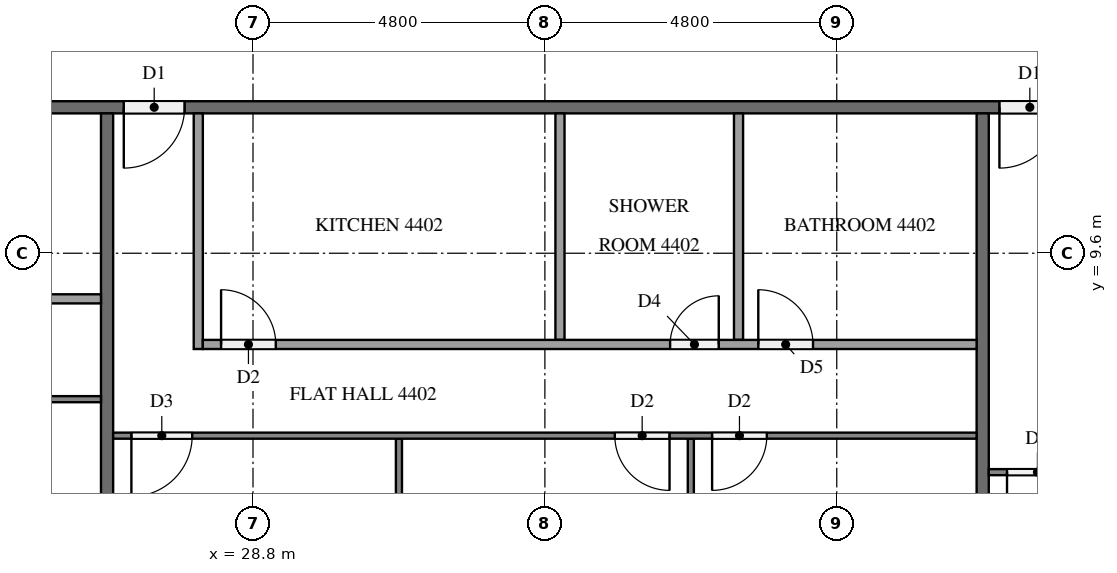
"""IFC4 building model, lengths in metres.
Left out: names, types, materials, properties, quantities, classifications, styles, units other than length and angle.
Written with IfcOpenShell. Run it as: python <this file> out.ifc"""

import sys

from ifc_helpers import new_model, si_unit, direction, frame, frame_2d, origin, place, context, subcontext, project, spatial, rectangle, extrude, element, fill, save


model = new_model("IFC4")
c1 = context("Model", 3, precision=1e-05, world=origin(), true_north=direction((0.0, 1.0)))
c2 = subcontext(c1, "Body", "Model", "MODEL_VIEW")
j1 = project(units=[si_unit("LENGTHUNIT", "METRE"), si_unit("PLANEANGLEUNIT", "RADIAN")], contexts=[c1])
p1 = place(None, origin())
s1 = spatial("IfcSite", under=j1, at=p1, CompositionType="ELEMENT")
p2 = place(p1, origin())
s2 = spatial("IfcBuilding", under=s1, at=p2, CompositionType="ELEMENT")
p3 = place(p2, frame((0.0, 0.0, 170.0)))
s3 = spatial("IfcBuildingStorey", under=s2, at=p3, CompositionType="ELEMENT", Elevation=170.0)
p4 = place(p3, frame((50.5, 12.0, 0.0), z_axis=(0.0, 0.0, 1.0), x_axis=(-1.0, 0.0, 0.0)))
e1 = element("IfcWall", 1, at=p4, inside=s3, PredefinedType="PARTITIONING", context=c2, shape_type="SweptSolid", body=[
    extrude(rectangle(XDim=38.6, YDim=0.2, at=frame_2d((19.3, 0.0))), origin(), (0.0, 0.0, 1.0), 3.1),
])
p5 = place(p4, frame((37.225, 0.0, 0.0)))
e2 = element("IfcOpeningElement", 2, at=p5, cuts=e1, PredefinedType="OPENING", context=c2, shape_type="SweptSolid", body=[
    extrude(rectangle(XDim=1.0, YDim=2.1, at=frame_2d((0.5, 1.05))), frame((0.0, 0.11, 0.0), z_axis=(0.0, -1.0, 0.0), x_axis=(1.0, 0.0, 0.0)), (0.0, 0.0, 1.0), 0.22),
])
p6 = place(p4, frame((22.825, 0.0, 0.0)))
e3 = element("IfcOpeningElement", 3, at=p6, cuts=e1, PredefinedType="OPENING", context=c2, shape_type="SweptSolid", body=[
    extrude(rectangle(XDim=1.0, YDim=2.1, at=frame_2d((0.5, 1.05))), frame((0.0, 0.11, 0.0), z_axis=(0.0, -1.0, 0.0), x_axis=(1.0, 0.0, 0.0)), (0.0, 0.0, 1.0), 0.22),
])
p7 = place(p4, frame((8.425, 0.0, 0.0)))
e4 = element("IfcOpeningElement", 4, at=p7, cuts=e1, PredefinedType="OPENING", context=c2, shape_type="SweptSolid", body=[
    extrude(rectangle(XDim=1.0, YDim=2.1, at=frame_2d((0.5, 1.05))), frame((0.0, 0.11, 0.0), z_axis=(0.0, -1.0, 0.0), x_axis=(1.0, 0.0, 0.0)), (0.0, 0.0, 1.0), 0.22),
])
for number, where, z_axis, x_axis in (
    (5, (26.4, 11.9, 0.0), (0.0, 0.0, 1.0), (0.0, -1.0, 0.0)),
    (6, (40.8, 11.9, 0.0), (0.0, 0.0, 1.0), (0.0, -1.0, 0.0)),
):
    element("IfcWall", number, at=place(p3, frame(where, z_axis=z_axis, x_axis=x_axis)), inside=s3, PredefinedType="PARTITIONING", context=c2, shape_type="SweptSolid", body=[
        extrude(rectangle(XDim=11.8, YDim=0.2, at=frame_2d((5.9, 0.0))), origin(), (0.0, 0.0, 1.0), 3.1),
    ])
p8 = place(p3, frame((26.3, 7.2, 0.0), z_axis=(0.0, 0.0, 1.0), x_axis=(-1.0, 0.0, 0.0)))
e7 = element("IfcWall", 7, at=p8, inside=s3, PredefinedType="PARTITIONING", context=c2, shape_type="SweptSolid", body=[
    extrude(rectangle(XDim=14.2, YDim=0.1, at=frame_2d((7.1, 0.0))), origin(), (0.0, 0.0, 1.0), 3.1),
])
p9 = place(p8, frame((12.9, 0.0, 0.0)))
e8 = element("IfcOpeningElement", 8, at=p9, cuts=e7, PredefinedType="OPENING", context=c2, shape_type="SweptSolid", body=[
    extrude(rectangle(XDim=1.0, YDim=2.1, at=frame_2d((0.5, 1.05))), frame((0.0, 0.06, 0.0), z_axis=(0.0, -1.0, 0.0), x_axis=(1.0, 0.0, 0.0)), (0.0, 0.0, 1.0), 0.12),
])
p10 = place(p8, frame((5.05, 0.0, 0.0)))
e9 = element("IfcOpeningElement", 9, at=p10, cuts=e7, PredefinedType="OPENING", context=c2, shape_type="SweptSolid", body=[
    extrude(rectangle(XDim=0.9, YDim=2.1, at=frame_2d((0.45, 1.05))), frame((0.0, 0.06, 0.0), z_axis=(0.0, -1.0, 0.0), x_axis=(1.0, 0.0, 0.0)), (0.0, 0.0, 1.0), 0.12),
])
p11 = place(p8, frame((3.45, 0.0, 0.0)))
e10 = element("IfcOpeningElement", 10, at=p11, cuts=e7, PredefinedType="OPENING", context=c2, shape_type="SweptSolid", body=[
    extrude(rectangle(XDim=0.9, YDim=2.1, at=frame_2d((0.45, 1.05))), frame((0.0, 0.06, 0.0), z_axis=(0.0, -1.0, 0.0), x_axis=(1.0, 0.0, 0.0)), (0.0, 0.0, 1.0), 0.12),
])
p12 = place(p3, frame((13.575, 8.85, 0.0), z_axis=(0.0, 0.0, 1.0), x_axis=(1.0, 0.0, 0.0)))
e11 = element("IfcWall", 11, at=p12, inside=s3, PredefinedType="PARTITIONING", context=c2, shape_type="SweptSolid", body=[
    extrude(rectangle(XDim=12.725, YDim=0.15, at=frame_2d((6.363, 0.0))), origin(), (0.0, 0.0, 1.0), 3.1),
])
p13 = place(p12, frame((0.3, 0.0, 0.0)))
e12 = element("IfcOpeningElement", 12, at=p13, cuts=e11, PredefinedType="OPENING", context=c2, shape_type="SweptSolid", body=[
    extrude(rectangle(XDim=0.9, YDim=2.1, at=frame_2d((0.45, 1.05))), frame((0.0, 0.085, 0.0), z_axis=(0.0, -1.0, 0.0), x_axis=(1.0, 0.0, 0.0)), (0.0, 0.0, 1.0), 0.17),
])
p14 = place(p12, frame((7.685, 0.0, 0.0)))
e13 = element("IfcOpeningElement", 13, at=p14, cuts=e11, PredefinedType="OPENING", context=c2, shape_type="SweptSolid", body=[
    extrude(rectangle(XDim=0.8, YDim=2.1, at=frame_2d((0.4, 1.05))), frame((0.0, 0.085, 0.0), z_axis=(0.0, -1.0, 0.0), x_axis=(1.0, 0.0, 0.0)), (0.0, 0.0, 1.0), 0.17),
])
p15 = place(p12, frame((9.135, 0.0, 0.0)))
e14 = element("IfcOpeningElement", 14, at=p15, cuts=e11, PredefinedType="OPENING", context=c2, shape_type="SweptSolid", body=[
    extrude(rectangle(XDim=0.9, YDim=2.1, at=frame_2d((0.45, 1.05))), frame((0.0, 0.085, 0.0), z_axis=(0.0, -1.0, 0.0), x_axis=(1.0, 0.0, 0.0)), (0.0, 0.0, 1.0), 0.17),
])
for number, where, z_axis, x_axis in (
    (15, (31.2, 6.55, 0.0), (0.0, 0.0, 1.0), (0.0, -1.0, 0.0)),
    (16, (36.0, 6.55, 0.0), (0.0, 0.0, 1.0), (0.0, -1.0, 0.0)),
):
    element("IfcWall", number, at=place(p3, frame(where, z_axis=z_axis, x_axis=x_axis)), inside=s3, PredefinedType="PARTITIONING", context=c2, shape_type="SweptSolid", body=[
        extrude(rectangle(XDim=6.45, YDim=0.1, at=frame_2d((3.225, 0.0))), origin(), (0.0, 0.0, 1.0), 3.1),
    ])
p16 = place(p3, frame((40.7, 6.6, 0.0), z_axis=(0.0, 0.0, 1.0), x_axis=(-1.0, 0.0, 0.0)))
e17 = element("IfcWall", 17, at=p16, inside=s3, PredefinedType="PARTITIONING", context=c2, shape_type="SweptSolid", body=[
    extrude(rectangle(XDim=14.2, YDim=0.1, at=frame_2d((7.1, 0.0))), origin(), (0.0, 0.0, 1.0), 3.1),
])
p17 = place(p16, frame((12.9, 0.0, 0.0)))
e18 = element("IfcOpeningElement", 18, at=p17, cuts=e17, PredefinedType="OPENING", context=c2, shape_type="SweptSolid", body=[
    extrude(rectangle(XDim=1.0, YDim=2.1, at=frame_2d((0.5, 1.05))), frame((0.0, 0.06, 0.0), z_axis=(0.0, -1.0, 0.0), x_axis=(1.0, 0.0, 0.0)), (0.0, 0.0, 1.0), 0.12),
])
p18 = place(p16, frame((5.05, 0.0, 0.0)))
e19 = element("IfcOpeningElement", 19, at=p18, cuts=e17, PredefinedType="OPENING", context=c2, shape_type="SweptSolid", body=[
    extrude(rectangle(XDim=0.9, YDim=2.1, at=frame_2d((0.45, 1.05))), frame((0.0, 0.06, 0.0), z_axis=(0.0, -1.0, 0.0), x_axis=(1.0, 0.0, 0.0)), (0.0, 0.0, 1.0), 0.12),
])
p19 = place(p16, frame((3.45, 0.0, 0.0)))
e20 = element("IfcOpeningElement", 20, at=p19, cuts=e17, PredefinedType="OPENING", context=c2, shape_type="SweptSolid", body=[
    extrude(rectangle(XDim=0.9, YDim=2.1, at=frame_2d((0.45, 1.05))), frame((0.0, 0.06, 0.0), z_axis=(0.0, -1.0, 0.0), x_axis=(1.0, 0.0, 0.0)), (0.0, 0.0, 1.0), 0.12),
])
for number, where, z_axis, x_axis in (
    (21, (33.848, 11.9, 0.0), (0.0, 0.0, 1.0), (0.0, -1.0, 0.0)),
    (22, (36.785, 11.9, 0.0), (0.0, 0.0, 1.0), (0.0, -1.0, 0.0)),
):
    element("IfcWall", number, at=place(p3, frame(where, z_axis=z_axis, x_axis=x_axis)), inside=s3, PredefinedType="PARTITIONING", context=c2, shape_type="SweptSolid", body=[
        extrude(rectangle(XDim=3.725, YDim=0.15, at=frame_2d((1.862, 0.0))), origin(), (0.0, 0.0, 1.0), 3.1),
    ])
p20 = place(p3, frame((27.9, 11.9, 0.0), z_axis=(0.0, 0.0, 1.0), x_axis=(0.0, -1.0, 0.0)))
e23 = element("IfcWall", 23, at=p20, inside=s3, PredefinedType="PARTITIONING", context=c2, shape_type="SweptSolid", body=[
    extrude(rectangle(XDim=3.875, YDim=0.15, at=frame_2d((1.938, 0.0))), origin(), (0.0, 0.0, 1.0), 3.1),
])
p21 = place(p3, frame((27.975, 8.1, 0.0), z_axis=(0.0, 0.0, 1.0), x_axis=(1.0, 0.0, 0.0)))
e24 = element("IfcWall", 24, at=p21, inside=s3, PredefinedType="PARTITIONING", context=c2, shape_type="SweptSolid", body=[
    extrude(rectangle(XDim=12.725, YDim=0.15, at=frame_2d((6.362, 0.0))), origin(), (0.0, 0.0, 1.0), 3.1),
])
p22 = place(p21, frame((0.3, 0.0, 0.0)))
e25 = element("IfcOpeningElement", 25, at=p22, cuts=e24, PredefinedType="OPENING", context=c2, shape_type="SweptSolid", body=[
    extrude(rectangle(XDim=0.9, YDim=2.1, at=frame_2d((0.45, 1.05))), frame((0.0, 0.085, 0.0), z_axis=(0.0, -1.0, 0.0), x_axis=(1.0, 0.0, 0.0)), (0.0, 0.0, 1.0), 0.17),
])
p23 = place(p21, frame((7.685, 0.0, 0.0)))
e26 = element("IfcOpeningElement", 26, at=p23, cuts=e24, PredefinedType="OPENING", context=c2, shape_type="SweptSolid", body=[
    extrude(rectangle(XDim=0.8, YDim=2.1, at=frame_2d((0.4, 1.05))), frame((0.0, 0.085, 0.0), z_axis=(0.0, -1.0, 0.0), x_axis=(1.0, 0.0, 0.0)), (0.0, 0.0, 1.0), 0.17),
])
p24 = place(p21, frame((9.135, 0.0, 0.0)))
e27 = element("IfcOpeningElement", 27, at=p24, cuts=e24, PredefinedType="OPENING", context=c2, shape_type="SweptSolid", body=[
    extrude(rectangle(XDim=0.9, YDim=2.1, at=frame_2d((0.45, 1.05))), frame((0.0, 0.085, 0.0), z_axis=(0.0, -1.0, 0.0), x_axis=(1.0, 0.0, 0.0)), (0.0, 0.0, 1.0), 0.17),
])
p25 = place(p3, frame((50.3, 6.0, 0.0), z_axis=(0.0, 0.0, 1.0), x_axis=(-1.0, 0.0, 0.0)))
e28 = element("IfcWall", 28, at=p25, inside=s3, PredefinedType="PARTITIONING", context=c2, shape_type="SweptSolid", body=[
    extrude(rectangle(XDim=9.4, YDim=0.1, at=frame_2d((4.7, 0.0))), origin(), (0.0, 0.0, 1.0), 3.1),
])
p26 = place(p25, frame((8.1, 0.0, 0.0)))
e29 = element("IfcOpeningElement", 29, at=p26, cuts=e28, PredefinedType="OPENING", context=c2, shape_type="SweptSolid", body=[
    extrude(rectangle(XDim=1.0, YDim=2.1, at=frame_2d((0.5, 1.05))), frame((0.0, 0.06, 0.0), z_axis=(0.0, -1.0, 0.0), x_axis=(1.0, 0.0, 0.0)), (0.0, 0.0, 1.0), 0.12),
])
p27 = place(p25, frame((0.3, 0.0, 0.0)))
e30 = element("IfcOpeningElement", 30, at=p27, cuts=e28, PredefinedType="OPENING", context=c2, shape_type="SweptSolid", body=[
    extrude(rectangle(XDim=0.9, YDim=2.1, at=frame_2d((0.45, 1.05))), frame((0.0, 0.06, 0.0), z_axis=(0.0, -1.0, 0.0), x_axis=(1.0, 0.0, 0.0)), (0.0, 0.0, 1.0), 0.12),
])
p28 = place(p6, origin())
e31 = element("IfcDoor", 31, at=p28, inside=s3, OperationType="SINGLE_SWING_RIGHT", PredefinedType="DOOR", context=c2, shape_type="SweptSolid", body=[
    extrude(rectangle(XDim=1.0, YDim=2.1, at=frame_2d((0.5, 1.05))), frame((0.0, 0.025, 0.0), z_axis=(0.0, -1.0, 0.0), x_axis=(1.0, 0.0, 0.0)), (0.0, 0.0, 1.0), 0.05),
])
fill(e3, e31)
p29 = place(p7, origin())
e32 = element("IfcDoor", 32, at=p29, inside=s3, OperationType="SINGLE_SWING_RIGHT", PredefinedType="DOOR", context=c2, shape_type="SweptSolid", body=[
    extrude(rectangle(XDim=1.0, YDim=2.1, at=frame_2d((0.5, 1.05))), frame((0.0, 0.025, 0.0), z_axis=(0.0, -1.0, 0.0), x_axis=(1.0, 0.0, 0.0)), (0.0, 0.0, 1.0), 0.05),
])
fill(e4, e32)
p30 = place(p17, origin())
e33 = element("IfcDoor", 33, at=p30, inside=s3, OperationType="SINGLE_SWING_RIGHT", PredefinedType="DOOR", context=c2, shape_type="SweptSolid", body=[
    extrude(rectangle(XDim=1.0, YDim=2.1, at=frame_2d((0.5, 1.05))), frame((0.0, 0.025, 0.0), z_axis=(0.0, -1.0, 0.0), x_axis=(1.0, 0.0, 0.0)), (0.0, 0.0, 1.0), 0.05),
])
fill(e18, e33)
p31 = place(p18, origin())
e34 = element("IfcDoor", 34, at=p31, inside=s3, OperationType="SINGLE_SWING_LEFT", PredefinedType="DOOR", context=c2, shape_type="SweptSolid", body=[
    extrude(rectangle(XDim=0.9, YDim=2.1, at=frame_2d((0.45, 1.05))), frame((0.0, 0.025, 0.0), z_axis=(0.0, -1.0, 0.0), x_axis=(1.0, 0.0, 0.0)), (0.0, 0.0, 1.0), 0.05),
])
fill(e19, e34)
p32 = place(p19, origin())
e35 = element("IfcDoor", 35, at=p32, inside=s3, OperationType="SINGLE_SWING_RIGHT", PredefinedType="DOOR", context=c2, shape_type="SweptSolid", body=[
    extrude(rectangle(XDim=0.9, YDim=2.1, at=frame_2d((0.45, 1.05))), frame((0.0, 0.025, 0.0), z_axis=(0.0, -1.0, 0.0), x_axis=(1.0, 0.0, 0.0)), (0.0, 0.0, 1.0), 0.05),
])
fill(e20, e35)
p33 = place(p22, origin())
e36 = element("IfcDoor", 36, at=p33, inside=s3, OperationType="SINGLE_SWING_LEFT", PredefinedType="DOOR", context=c2, shape_type="SweptSolid", body=[
    extrude(rectangle(XDim=0.9, YDim=2.1, at=frame_2d((0.45, 1.05))), frame((0.0, 0.025, 0.0), z_axis=(0.0, -1.0, 0.0), x_axis=(1.0, 0.0, 0.0)), (0.0, 0.0, 1.0), 0.05),
])
fill(e25, e36)
p34 = place(p23, origin())
e37 = element("IfcDoor", 37, at=p34, inside=s3, OperationType="SINGLE_SWING_RIGHT", PredefinedType="DOOR", context=c2, shape_type="SweptSolid", body=[
    extrude(rectangle(XDim=0.8, YDim=2.1, at=frame_2d((0.4, 1.05))), frame((0.0, 0.025, 0.0), z_axis=(0.0, -1.0, 0.0), x_axis=(1.0, 0.0, 0.0)), (0.0, 0.0, 1.0), 0.05),
])
fill(e26, e37)
p35 = place(p24, origin())
e38 = element("IfcDoor", 38, at=p35, inside=s3, OperationType="SINGLE_SWING_LEFT", PredefinedType="DOOR", context=c2, shape_type="SweptSolid", body=[
    extrude(rectangle(XDim=0.9, YDim=2.1, at=frame_2d((0.45, 1.05))), frame((0.0, 0.025, 0.0), z_axis=(0.0, -1.0, 0.0), x_axis=(1.0, 0.0, 0.0)), (0.0, 0.0, 1.0), 0.05),
])
fill(e27, e38)
p36 = place(p26, origin())
e39 = element("IfcDoor", 39, at=p36, inside=s3, OperationType="SINGLE_SWING_RIGHT", PredefinedType="DOOR", context=c2, shape_type="SweptSolid", body=[
    extrude(rectangle(XDim=1.0, YDim=2.1, at=frame_2d((0.5, 1.05))), frame((0.0, 0.025, 0.0), z_axis=(0.0, -1.0, 0.0), x_axis=(1.0, 0.0, 0.0)), (0.0, 0.0, 1.0), 0.05),
])
fill(e29, e39)
save(model, sys.argv[1])
